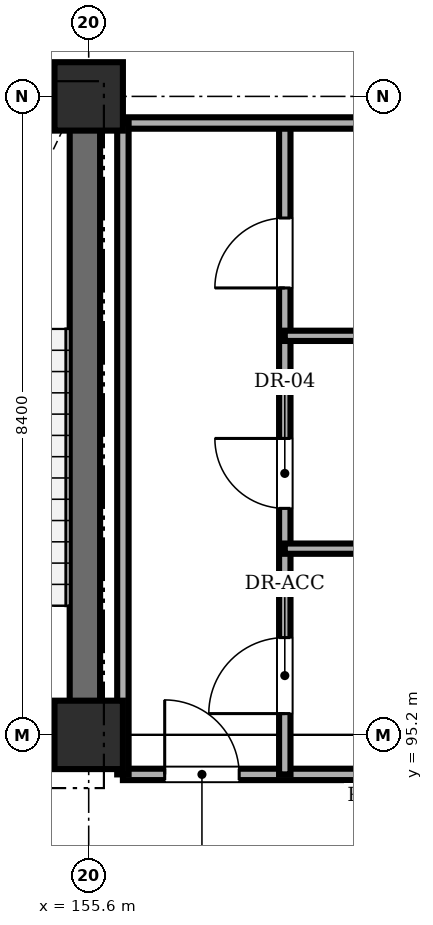
"""IFC4 building model, lengths in metres.
Left out: names, types, materials, properties, quantities, classifications, styles, units other than length and angle.
Written with IfcOpenShell. Run it as: python <this file> out.ifc"""

import sys

from ifc_helpers import new_model, si_unit, direction, frame, frame_2d, origin, origin_2d, place, context, subcontext, project, spatial, rectangle, extrude, element, fill, save


model = new_model("IFC4")
c1 = context("Model", 3, precision=1e-05, world=origin(), true_north=direction((0.0, 1.0)))
c2 = subcontext(c1, "Body", "Model", "MODEL_VIEW")
j1 = project(units=[si_unit("LENGTHUNIT", "METRE"), si_unit("PLANEANGLEUNIT", "RADIAN")], contexts=[c1])
p1 = place(None, origin())
s1 = spatial("IfcSite", under=j1, at=p1, CompositionType="ELEMENT")
p2 = place(p1, origin())
s2 = spatial("IfcBuilding", under=s1, at=p2, CompositionType="ELEMENT")
p3 = place(p2, frame((0.0, 0.0, 10.2)))
s3 = spatial("IfcBuildingStorey", under=s2, at=p3, CompositionType="ELEMENT", Elevation=10.2)
for number, where, z_axis, x_axis in (
    (1, (155.6, 95.2, 0.0), (0.0, 0.0, 1.0), (1.0, 0.0, 0.0)),
    (2, (155.6, 103.6, 0.0), (0.0, 0.0, 1.0), (1.0, 0.0, 0.0)),
):
    element("IfcColumn", number, at=place(p3, frame(where, z_axis=z_axis, x_axis=x_axis)), inside=s3, PredefinedType="COLUMN", context=c2, shape_type="SweptSolid", body=[
        extrude(rectangle(XDim=0.9, YDim=0.9, at=origin_2d()), origin(), (0.0, 0.0, 1.0), 4.26),
    ])
for number, where, z_axis, x_axis in (
    (3, (151.85, 95.25, 0.0), (0.0, 0.0, 1.0), (1.0, 0.0, 0.0)),
    (4, (151.85, 103.55, 0.0), (0.0, 0.0, 1.0), (1.0, 0.0, 0.0)),
):
    element("IfcWall", number, at=place(p3, frame(where, z_axis=z_axis, x_axis=x_axis)), inside=s3, PredefinedType="SHEAR", context=c2, shape_type="SweptSolid", body=[
        extrude(rectangle(XDim=3.9, YDim=0.4, at=frame_2d((1.95, 0.0))), origin(), (0.0, 0.0, 1.0), 4.26),
    ])
p4 = place(p3, frame((155.55, 95.45, 0.0), z_axis=(0.0, 0.0, 1.0), x_axis=(0.0, 1.0, 0.0)))
e5 = element("IfcWall", 5, at=p4, inside=s3, PredefinedType="SHEAR", context=c2, shape_type="SweptSolid", body=[
    extrude(rectangle(XDim=7.9, YDim=0.4, at=frame_2d((3.95, 0.0))), origin(), (0.0, 0.0, 1.0), 4.26),
])
p5 = place(p3, frame((156.05, 94.68, 0.0), z_axis=(0.0, 0.0, 1.0), x_axis=(1.0, 0.0, 0.0)))
e6 = element("IfcWall", 6, at=p5, inside=s3, PredefinedType="PARTITIONING", context=c2, shape_type="SweptSolid", body=[
    extrude(rectangle(XDim=7.15, YDim=0.15, at=frame_2d((3.575, 0.0))), origin(), (0.0, 0.0, 1.0), 4.26),
])
p6 = place(p5, frame((0.55, 0.0, 0.0)))
e7 = element("IfcOpeningElement", 7, at=p6, cuts=e6, PredefinedType="OPENING", context=c2, shape_type="SweptSolid", body=[
    extrude(rectangle(XDim=0.98, YDim=2.12, at=frame_2d((0.49, 1.06))), frame((0.0, 0.085, 0.0), z_axis=(0.0, -1.0, 0.0), x_axis=(1.0, 0.0, 0.0)), (0.0, 0.0, 1.0), 0.17),
])
p7 = place(p3, frame((158.18, 94.68, 0.0), z_axis=(0.0, 0.0, 1.0), x_axis=(0.0, 1.0, 0.0)))
e8 = element("IfcWall", 8, at=p7, inside=s3, PredefinedType="PARTITIONING", context=c2, shape_type="SweptSolid", body=[
    extrude(rectangle(XDim=8.57, YDim=0.15, at=frame_2d((4.285, 0.0))), origin(), (0.0, 0.0, 1.0), 4.26),
])
p8 = place(p7, frame((0.8, 0.0, 0.0)))
e9 = element("IfcOpeningElement", 9, at=p8, cuts=e8, PredefinedType="OPENING", context=c2, shape_type="SweptSolid", body=[
    extrude(rectangle(XDim=1.0, YDim=2.12, at=frame_2d((0.5, 1.06))), frame((0.0, 0.085, 0.0), z_axis=(0.0, -1.0, 0.0), x_axis=(1.0, 0.0, 0.0)), (0.0, 0.0, 1.0), 0.17),
])
p9 = place(p7, frame((3.5, 0.0, 0.0)))
e10 = element("IfcOpeningElement", 10, at=p9, cuts=e8, PredefinedType="OPENING", context=c2, shape_type="SweptSolid", body=[
    extrude(rectangle(XDim=0.92, YDim=2.1, at=frame_2d((0.46, 1.05))), frame((0.0, 0.085, 0.0), z_axis=(0.0, -1.0, 0.0), x_axis=(1.0, 0.0, 0.0)), (0.0, 0.0, 1.0), 0.17),
])
p10 = place(p7, frame((6.4, 0.0, 0.0)))
e11 = element("IfcOpeningElement", 11, at=p10, cuts=e8, PredefinedType="OPENING", context=c2, shape_type="SweptSolid", body=[
    extrude(rectangle(XDim=0.92, YDim=2.1, at=frame_2d((0.46, 1.05))), frame((0.0, 0.085, 0.0), z_axis=(0.0, -1.0, 0.0), x_axis=(1.0, 0.0, 0.0)), (0.0, 0.0, 1.0), 0.17),
])
for number, where, z_axis, x_axis in (
    (12, (158.18, 97.65, 0.0), (0.0, 0.0, 1.0), (1.0, 0.0, 0.0)),
    (13, (158.18, 100.45, 0.0), (0.0, 0.0, 1.0), (1.0, 0.0, 0.0)),
):
    element("IfcWall", number, at=place(p3, frame(where, z_axis=z_axis, x_axis=x_axis)), inside=s3, PredefinedType="PARTITIONING", context=c2, shape_type="SweptSolid", body=[
        extrude(rectangle(XDim=5.02, YDim=0.135, at=frame_2d((2.51, 0.0))), origin(), (0.0, 0.0, 1.0), 4.26),
    ])
p11 = place(p3, frame((156.05, 103.25, 0.0), z_axis=(0.0, 0.0, 1.0), x_axis=(1.0, 0.0, 0.0)))
e14 = element("IfcWall", 14, at=p11, inside=s3, PredefinedType="PARTITIONING", context=c2, shape_type="SweptSolid", body=[
    extrude(rectangle(XDim=7.15, YDim=0.15, at=frame_2d((3.575, 0.0))), origin(), (0.0, 0.0, 1.0), 4.26),
])
p12 = place(p3, frame((156.05, 94.68, 0.0), z_axis=(0.0, 0.0, 1.0), x_axis=(0.0, 1.0, 0.0)))
e15 = element("IfcWall", 15, at=p12, inside=s3, PredefinedType="PARTITIONING", context=c2, shape_type="SweptSolid", body=[
    extrude(rectangle(XDim=8.57, YDim=0.15, at=frame_2d((4.285, 0.0))), origin(), (0.0, 0.0, 1.0), 4.26),
])
p13 = place(p6, origin())
e16 = element("IfcDoor", 16, at=p13, inside=s3, OperationType="SINGLE_SWING_LEFT", PredefinedType="DOOR", context=c2, shape_type="SweptSolid", body=[
    extrude(rectangle(XDim=0.98, YDim=2.12, at=frame_2d((0.49, 1.06))), frame((0.0, 0.025, 0.0), z_axis=(0.0, -1.0, 0.0), x_axis=(1.0, 0.0, 0.0)), (0.0, 0.0, 1.0), 0.05),
])
fill(e7, e16)
p14 = place(p8, origin())
e17 = element("IfcDoor", 17, at=p14, inside=s3, OperationType="SINGLE_SWING_LEFT", PredefinedType="DOOR", context=c2, shape_type="SweptSolid", body=[
    extrude(rectangle(XDim=1.0, YDim=2.12, at=frame_2d((0.5, 1.06))), frame((0.0, 0.025, 0.0), z_axis=(0.0, -1.0, 0.0), x_axis=(1.0, 0.0, 0.0)), (0.0, 0.0, 1.0), 0.05),
])
fill(e9, e17)
p15 = place(p9, origin())
e18 = element("IfcDoor", 18, at=p15, inside=s3, OperationType="SINGLE_SWING_RIGHT", PredefinedType="DOOR", context=c2, shape_type="SweptSolid", body=[
    extrude(rectangle(XDim=0.92, YDim=2.1, at=frame_2d((0.46, 1.05))), frame((0.0, 0.025, 0.0), z_axis=(0.0, -1.0, 0.0), x_axis=(1.0, 0.0, 0.0)), (0.0, 0.0, 1.0), 0.05),
])
fill(e10, e18)
p16 = place(p10, origin())
e19 = element("IfcDoor", 19, at=p16, inside=s3, OperationType="SINGLE_SWING_LEFT", PredefinedType="DOOR", context=c2, shape_type="SweptSolid", body=[
    extrude(rectangle(XDim=0.92, YDim=2.1, at=frame_2d((0.46, 1.05))), frame((0.0, 0.025, 0.0), z_axis=(0.0, -1.0, 0.0), x_axis=(1.0, 0.0, 0.0)), (0.0, 0.0, 1.0), 0.05),
])
fill(e11, e19)
save(model, sys.argv[1])
